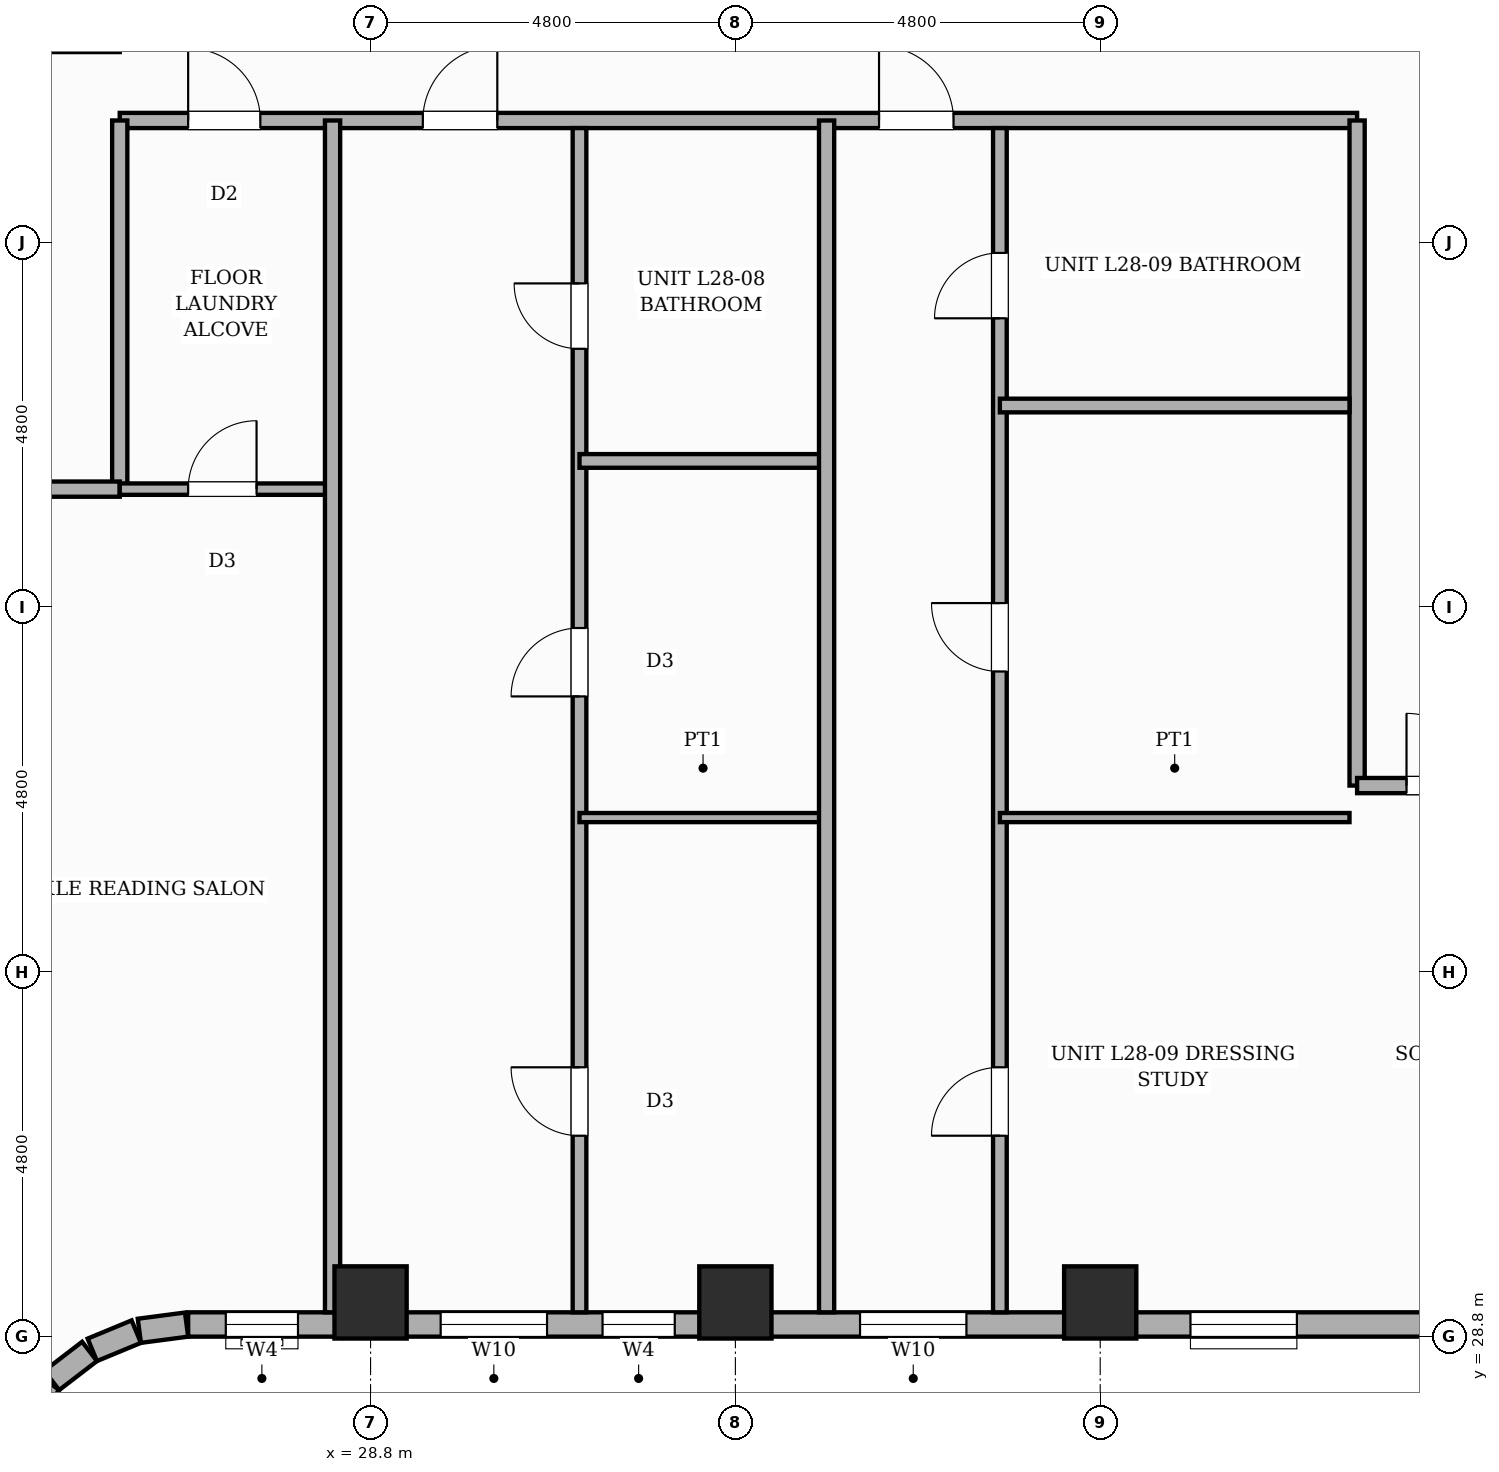
"""IFC4 building model, lengths in metres.
Left out: names, types, materials, properties, quantities, classifications, styles, units other than length and angle.
Written with IfcOpenShell. Run it as: python <this file> out.ifc"""

import sys

from ifc_helpers import new_model, si_unit, direction, frame, frame_2d, origin, origin_2d, place, context, subcontext, project, spatial, rectangle, extrude, element, fill, save


model = new_model("IFC4")
c1 = context("Model", 3, precision=1e-05, world=origin(), true_north=direction((0.0, 1.0)))
c2 = subcontext(c1, "Body", "Model", "MODEL_VIEW")
j1 = project(units=[si_unit("LENGTHUNIT", "METRE"), si_unit("PLANEANGLEUNIT", "RADIAN")], contexts=[c1])
p1 = place(None, origin())
s1 = spatial("IfcSite", under=j1, at=p1, CompositionType="ELEMENT")
p2 = place(p1, origin())
s2 = spatial("IfcBuilding", under=s1, at=p2, CompositionType="ELEMENT")
p3 = place(p2, frame((0.0, 0.0, 110.8)))
s3 = spatial("IfcBuildingStorey", under=s2, at=p3, CompositionType="ELEMENT", Elevation=110.8)
for number, where, z_axis, x_axis in (
    (1, (28.8, 29.25, 0.0), (0.0, 0.0, 1.0), (1.0, 0.0, 0.0)),
    (2, (33.6, 29.25, 0.0), (0.0, 0.0, 1.0), (1.0, 0.0, 0.0)),
    (3, (38.4, 29.25, 0.0), (0.0, 0.0, 1.0), (1.0, 0.0, 0.0)),
):
    element("IfcColumn", number, at=place(p3, frame(where, z_axis=z_axis, x_axis=x_axis)), inside=s3, PredefinedType="COLUMN", context=c2, shape_type="SweptSolid", body=[
        extrude(rectangle(XDim=0.95, YDim=0.95, at=origin_2d()), origin(), (0.0, 0.0, 1.0), 3.6),
    ])
p4 = place(p3, frame((50.4, 28.96, 0.0), z_axis=(0.0, 0.0, 1.0), x_axis=(-1.0, 0.0, 0.0)))
e4 = element("IfcWall", 4, at=p4, inside=s3, PredefinedType="STANDARD", context=c2, shape_type="SweptSolid", body=[
    extrude(rectangle(XDim=24.0, YDim=0.32, at=frame_2d((12.0, 0.0))), origin(), (0.0, 0.0, 1.0), 2.54),
])
p5 = place(p4, frame((19.278, 0.0, 0.65)))
e5 = element("IfcOpeningElement", 5, at=p5, cuts=e4, PredefinedType="OPENING", context=c2, shape_type="SweptSolid", body=[
    extrude(rectangle(XDim=1.4, YDim=1.1, at=frame_2d((0.7, 0.55))), frame((0.0, 0.17, 0.0), z_axis=(0.0, -1.0, 0.0), x_axis=(1.0, 0.0, 0.0)), (0.0, 0.0, 1.0), 0.34),
])
p6 = place(p4, frame((13.76, 0.0, 0.65)))
e6 = element("IfcOpeningElement", 6, at=p6, cuts=e4, PredefinedType="OPENING", context=c2, shape_type="SweptSolid", body=[
    extrude(rectangle(XDim=1.4, YDim=1.1, at=frame_2d((0.7, 0.55))), frame((0.0, 0.17, 0.0), z_axis=(0.0, -1.0, 0.0), x_axis=(1.0, 0.0, 0.0)), (0.0, 0.0, 1.0), 0.34),
])
p7 = place(p4, frame((22.555, 0.0, 0.45)))
e7 = element("IfcOpeningElement", 7, at=p7, cuts=e4, PredefinedType="OPENING", context=c2, shape_type="SweptSolid", body=[
    extrude(rectangle(XDim=0.95, YDim=1.8, at=frame_2d((0.475, 0.9))), frame((0.0, 0.17, 0.0), z_axis=(0.0, -1.0, 0.0), x_axis=(1.0, 0.0, 0.0)), (0.0, 0.0, 1.0), 0.34),
])
p8 = place(p4, frame((4.1, 0.0, 0.65)))
e8 = element("IfcOpeningElement", 8, at=p8, cuts=e4, PredefinedType="OPENING", context=c2, shape_type="SweptSolid", body=[
    extrude(rectangle(XDim=1.4, YDim=1.1, at=frame_2d((0.7, 0.55))), frame((0.0, 0.17, 0.0), z_axis=(0.0, -1.0, 0.0), x_axis=(1.0, 0.0, 0.0)), (0.0, 0.0, 1.0), 0.34),
])
p9 = place(p4, frame((17.598, 0.0, 0.45)))
e9 = element("IfcOpeningElement", 9, at=p9, cuts=e4, PredefinedType="OPENING", context=c2, shape_type="SweptSolid", body=[
    extrude(rectangle(XDim=0.95, YDim=1.8, at=frame_2d((0.475, 0.9))), frame((0.0, 0.17, 0.0), z_axis=(0.0, -1.0, 0.0), x_axis=(1.0, 0.0, 0.0)), (0.0, 0.0, 1.0), 0.34),
])
p10 = place(p4, frame((9.413, 0.0, 0.65)))
e10 = element("IfcOpeningElement", 10, at=p10, cuts=e4, PredefinedType="OPENING", context=c2, shape_type="SweptSolid", body=[
    extrude(rectangle(XDim=1.4, YDim=1.1, at=frame_2d((0.7, 0.55))), frame((0.0, 0.17, 0.0), z_axis=(0.0, -1.0, 0.0), x_axis=(1.0, 0.0, 0.0)), (0.0, 0.0, 1.0), 0.34),
])
p11 = place(p4, frame((0.656, 0.0, 0.45)))
e11 = element("IfcOpeningElement", 11, at=p11, cuts=e4, PredefinedType="OPENING", context=c2, shape_type="SweptSolid", body=[
    extrude(rectangle(XDim=0.95, YDim=1.8, at=frame_2d((0.475, 0.9))), frame((0.0, 0.17, 0.0), z_axis=(0.0, -1.0, 0.0), x_axis=(1.0, 0.0, 0.0)), (0.0, 0.0, 1.0), 0.34),
])
p12 = place(p3, frame((26.379, 28.958, 0.0), z_axis=(0.0, 0.0, 1.0), x_axis=(-0.991447664465, -0.130504898859, 0.0)))
e12 = element("IfcWall", 12, at=p12, inside=s3, PredefinedType="STANDARD", context=c2, shape_type="SweptSolid", body=[
    extrude(rectangle(XDim=0.627, YDim=0.32, at=frame_2d((0.313, 0.0))), origin(), (0.0, 0.0, 1.0), 2.54),
])
p13 = place(p3, frame((25.718, 28.866, 0.0), z_axis=(0.0, 0.0, 1.0), x_axis=(-0.923836271867, -0.382787856107, 0.0)))
e13 = element("IfcWall", 13, at=p13, inside=s3, PredefinedType="STANDARD", context=c2, shape_type="SweptSolid", body=[
    extrude(rectangle(XDim=0.626, YDim=0.32, at=frame_2d((0.313, 0.0))), origin(), (0.0, 0.0, 1.0), 3.36),
])
for number, where, z_axis, x_axis in (
    (14, (25.103, 28.605, 0.0), (0.0, 0.0, 1.0), (-0.793, -0.609, 0.0)),
    (15, (24.576, 28.195, 0.0), (0.0, 0.0, 1.0), (-0.609, -0.793, 0.0)),
):
    element("IfcWall", number, at=place(p3, frame(where, z_axis=z_axis, x_axis=x_axis)), inside=s3, PredefinedType="STANDARD", context=c2, shape_type="SweptSolid", body=[
        extrude(rectangle(XDim=0.626, YDim=0.32, at=frame_2d((0.313, 0.0))), origin(), (0.0, 0.0, 1.0), 3.36),
    ])
p14 = place(p3, frame((25.5, 44.8, 0.0), z_axis=(0.0, 0.0, 1.0), x_axis=(1.0, 0.0, 0.0)))
e16 = element("IfcWall", 16, at=p14, inside=s3, PredefinedType="PARTITIONING", context=c2, shape_type="SweptSolid", body=[
    extrude(rectangle(XDim=16.28, YDim=0.2, at=frame_2d((8.14, 0.0))), origin(), (0.0, 0.0, 1.0), 3.36),
])
p15 = place(p14, frame((0.9, 0.0, 0.0)))
e17 = element("IfcOpeningElement", 17, at=p15, cuts=e16, PredefinedType="OPENING", context=c2, shape_type="SweptSolid", body=[
    extrude(rectangle(XDim=0.95, YDim=2.15, at=frame_2d((0.475, 1.075))), frame((0.0, 0.11, 0.0), z_axis=(0.0, -1.0, 0.0), x_axis=(1.0, 0.0, 0.0)), (0.0, 0.0, 1.0), 0.22),
])
p16 = place(p14, frame((3.988, 0.0, 0.0)))
e18 = element("IfcOpeningElement", 18, at=p16, cuts=e16, PredefinedType="OPENING", context=c2, shape_type="SweptSolid", body=[
    extrude(rectangle(XDim=0.98, YDim=2.18, at=frame_2d((0.49, 1.09))), frame((0.0, 0.11, 0.0), z_axis=(0.0, -1.0, 0.0), x_axis=(1.0, 0.0, 0.0)), (0.0, 0.0, 1.0), 0.22),
])
p17 = place(p14, frame((9.99, 0.0, 0.0)))
e19 = element("IfcOpeningElement", 19, at=p17, cuts=e16, PredefinedType="OPENING", context=c2, shape_type="SweptSolid", body=[
    extrude(rectangle(XDim=0.98, YDim=2.18, at=frame_2d((0.49, 1.09))), frame((0.0, 0.11, 0.0), z_axis=(0.0, -1.0, 0.0), x_axis=(1.0, 0.0, 0.0)), (0.0, 0.0, 1.0), 0.22),
])
p18 = place(p3, frame((25.5, 39.95, 0.0), z_axis=(0.0, 0.0, 1.0), x_axis=(0.0, 1.0, 0.0)))
e20 = element("IfcWall", 20, at=p18, inside=s3, PredefinedType="PARTITIONING", context=c2, shape_type="SweptSolid", body=[
    extrude(rectangle(XDim=4.85, YDim=0.2, at=frame_2d((2.425, 0.0))), origin(), (0.0, 0.0, 1.0), 3.36),
])
p19 = place(p3, frame((22.75, 39.95, 0.0), z_axis=(0.0, 0.0, 1.0), x_axis=(1.0, 0.0, 0.0)))
e21 = element("IfcWall", 21, at=p19, inside=s3, PredefinedType="PARTITIONING", context=c2, shape_type="SweptSolid", body=[
    extrude(rectangle(XDim=2.75, YDim=0.2, at=frame_2d((1.375, 0.0))), origin(), (0.0, 0.0, 1.0), 3.36),
])
p20 = place(p3, frame((41.78, 36.05, 0.0), z_axis=(0.0, 0.0, 1.0), x_axis=(0.0, 1.0, 0.0)))
e22 = element("IfcWall", 22, at=p20, inside=s3, PredefinedType="PARTITIONING", context=c2, shape_type="SweptSolid", body=[
    extrude(rectangle(XDim=8.75, YDim=0.2, at=frame_2d((4.375, 0.0))), origin(), (0.0, 0.0, 1.0), 3.36),
])
p21 = place(p3, frame((41.78, 36.05, 0.0), z_axis=(0.0, 0.0, 1.0), x_axis=(1.0, 0.0, 0.0)))
e23 = element("IfcWall", 23, at=p21, inside=s3, PredefinedType="PARTITIONING", context=c2, shape_type="SweptSolid", body=[
    extrude(rectangle(XDim=2.24, YDim=0.2, at=frame_2d((1.12, 0.0))), origin(), (0.0, 0.0, 1.0), 3.36),
])
p22 = place(p21, frame((0.65, 0.0, 0.0)))
e24 = element("IfcOpeningElement", 24, at=p22, cuts=e23, PredefinedType="OPENING", context=c2, shape_type="SweptSolid", body=[
    extrude(rectangle(XDim=0.95, YDim=2.15, at=frame_2d((0.475, 1.075))), frame((0.0, 0.11, 0.0), z_axis=(0.0, -1.0, 0.0), x_axis=(1.0, 0.0, 0.0)), (0.0, 0.0, 1.0), 0.22),
])
p23 = place(p3, frame((25.5, 39.95, 0.0), z_axis=(0.0, 0.0, 1.0), x_axis=(1.0, 0.0, 0.0)))
e25 = element("IfcWall", 25, at=p23, inside=s3, PredefinedType="PARTITIONING", context=c2, shape_type="SweptSolid", body=[
    extrude(rectangle(XDim=2.8, YDim=0.15, at=frame_2d((1.4, 0.0))), origin(), (0.0, 0.0, 1.0), 3.36),
])
p24 = place(p23, frame((0.9, 0.0, 0.0)))
e26 = element("IfcOpeningElement", 26, at=p24, cuts=e25, PredefinedType="OPENING", context=c2, shape_type="SweptSolid", body=[
    extrude(rectangle(XDim=0.9, YDim=2.15, at=frame_2d((0.45, 1.075))), frame((0.0, 0.085, 0.0), z_axis=(0.0, -1.0, 0.0), x_axis=(1.0, 0.0, 0.0)), (0.0, 0.0, 1.0), 0.17),
])
p25 = place(p3, frame((28.3, 29.12, 0.0), z_axis=(0.0, 0.0, 1.0), x_axis=(0.0, 1.0, 0.0)))
e27 = element("IfcWall", 27, at=p25, inside=s3, PredefinedType="SOLIDWALL", context=c2, shape_type="SweptSolid", body=[
    extrude(rectangle(XDim=15.68, YDim=0.2, at=frame_2d((7.84, 0.0))), origin(), (0.0, 0.0, 1.0), 3.36),
])
p26 = place(p3, frame((31.549, 29.12, 0.0), z_axis=(0.0, 0.0, 1.0), x_axis=(0.0, 1.0, 0.0)))
e28 = element("IfcWall", 28, at=p26, inside=s3, PredefinedType="PLUMBINGWALL", context=c2, shape_type="SweptSolid", body=[
    extrude(rectangle(XDim=15.58, YDim=0.18, at=frame_2d((7.79, 0.0))), origin(), (0.0, 0.0, 1.0), 3.36),
])
p27 = place(p26, frame((2.323, 0.0, 0.0)))
e29 = element("IfcOpeningElement", 29, at=p27, cuts=e28, PredefinedType="OPENING", context=c2, shape_type="SweptSolid", body=[
    extrude(rectangle(XDim=0.9, YDim=2.15, at=frame_2d((0.45, 1.075))), frame((0.0, 0.1, 0.0), z_axis=(0.0, -1.0, 0.0), x_axis=(1.0, 0.0, 0.0)), (0.0, 0.0, 1.0), 0.2),
])
p28 = place(p26, frame((8.103, 0.0, 0.0)))
e30 = element("IfcOpeningElement", 30, at=p28, cuts=e28, PredefinedType="OPENING", context=c2, shape_type="SweptSolid", body=[
    extrude(rectangle(XDim=0.9, YDim=2.15, at=frame_2d((0.45, 1.075))), frame((0.0, 0.1, 0.0), z_axis=(0.0, -1.0, 0.0), x_axis=(1.0, 0.0, 0.0)), (0.0, 0.0, 1.0), 0.2),
])
p29 = place(p26, frame((12.677, 0.0, 0.0)))
e31 = element("IfcOpeningElement", 31, at=p29, cuts=e28, PredefinedType="OPENING", context=c2, shape_type="SweptSolid", body=[
    extrude(rectangle(XDim=0.86, YDim=2.1, at=frame_2d((0.43, 1.05))), frame((0.0, 0.1, 0.0), z_axis=(0.0, -1.0, 0.0), x_axis=(1.0, 0.0, 0.0)), (0.0, 0.0, 1.0), 0.2),
])
p30 = place(p3, frame((31.549, 35.629, 0.0), z_axis=(0.0, 0.0, 1.0), x_axis=(1.0, 0.0, 0.0)))
e32 = element("IfcWall", 32, at=p30, inside=s3, PredefinedType="PARTITIONING", context=c2, shape_type="SweptSolid", body=[
    extrude(rectangle(XDim=3.251, YDim=0.12, at=frame_2d((1.625, 0.0))), origin(), (0.0, 0.0, 1.0), 3.36),
])
p31 = place(p3, frame((31.549, 40.321, 0.0), z_axis=(0.0, 0.0, 1.0), x_axis=(1.0, 0.0, 0.0)))
e33 = element("IfcWall", 33, at=p31, inside=s3, PredefinedType="PLUMBINGWALL", context=c2, shape_type="SweptSolid", body=[
    extrude(rectangle(XDim=3.251, YDim=0.18, at=frame_2d((1.625, 0.0))), origin(), (0.0, 0.0, 1.0), 3.36),
])
p32 = place(p3, frame((34.8, 29.12, 0.0), z_axis=(0.0, 0.0, 1.0), x_axis=(0.0, 1.0, 0.0)))
e34 = element("IfcWall", 34, at=p32, inside=s3, PredefinedType="SOLIDWALL", context=c2, shape_type="SweptSolid", body=[
    extrude(rectangle(XDim=15.68, YDim=0.2, at=frame_2d((7.84, 0.0))), origin(), (0.0, 0.0, 1.0), 3.36),
])
p33 = place(p3, frame((37.08, 29.12, 0.0), z_axis=(0.0, 0.0, 1.0), x_axis=(0.0, 1.0, 0.0)))
e35 = element("IfcWall", 35, at=p33, inside=s3, PredefinedType="PLUMBINGWALL", context=c2, shape_type="SweptSolid", body=[
    extrude(rectangle(XDim=15.58, YDim=0.18, at=frame_2d((7.79, 0.0))), origin(), (0.0, 0.0, 1.0), 3.36),
])
p34 = place(p33, frame((2.323, 0.0, 0.0)))
e36 = element("IfcOpeningElement", 36, at=p34, cuts=e35, PredefinedType="OPENING", context=c2, shape_type="SweptSolid", body=[
    extrude(rectangle(XDim=0.9, YDim=2.15, at=frame_2d((0.45, 1.075))), frame((0.0, 0.1, 0.0), z_axis=(0.0, -1.0, 0.0), x_axis=(1.0, 0.0, 0.0)), (0.0, 0.0, 1.0), 0.2),
])
p35 = place(p33, frame((8.431, 0.0, 0.0)))
e37 = element("IfcOpeningElement", 37, at=p35, cuts=e35, PredefinedType="OPENING", context=c2, shape_type="SweptSolid", body=[
    extrude(rectangle(XDim=0.9, YDim=2.15, at=frame_2d((0.45, 1.075))), frame((0.0, 0.1, 0.0), z_axis=(0.0, -1.0, 0.0), x_axis=(1.0, 0.0, 0.0)), (0.0, 0.0, 1.0), 0.2),
])
p36 = place(p33, frame((13.077, 0.0, 0.0)))
e38 = element("IfcOpeningElement", 38, at=p36, cuts=e35, PredefinedType="OPENING", context=c2, shape_type="SweptSolid", body=[
    extrude(rectangle(XDim=0.86, YDim=2.1, at=frame_2d((0.43, 1.05))), frame((0.0, 0.1, 0.0), z_axis=(0.0, -1.0, 0.0), x_axis=(1.0, 0.0, 0.0)), (0.0, 0.0, 1.0), 0.2),
])
p37 = place(p3, frame((37.08, 35.629, 0.0), z_axis=(0.0, 0.0, 1.0), x_axis=(1.0, 0.0, 0.0)))
e39 = element("IfcWall", 39, at=p37, inside=s3, PredefinedType="PARTITIONING", context=c2, shape_type="SweptSolid", body=[
    extrude(rectangle(XDim=4.6, YDim=0.12, at=frame_2d((2.3, 0.0))), origin(), (0.0, 0.0, 1.0), 3.36),
])
p38 = place(p3, frame((37.08, 41.05, 0.0), z_axis=(0.0, 0.0, 1.0), x_axis=(1.0, 0.0, 0.0)))
e40 = element("IfcWall", 40, at=p38, inside=s3, PredefinedType="PLUMBINGWALL", context=c2, shape_type="SweptSolid", body=[
    extrude(rectangle(XDim=4.6, YDim=0.18, at=frame_2d((2.3, 0.0))), origin(), (0.0, 0.0, 1.0), 3.36),
])
p39 = place(p5, origin())
e41 = element("IfcWindow", 41, at=p39, inside=s3, PartitioningType="SINGLE_PANEL", PredefinedType="WINDOW", context=c2, shape_type="SweptSolid", body=[
    extrude(rectangle(XDim=1.4, YDim=1.1, at=frame_2d((0.7, 0.55))), frame((0.0, 0.03, 0.0), z_axis=(0.0, -1.0, 0.0), x_axis=(1.0, 0.0, 0.0)), (0.0, 0.0, 1.0), 0.06),
])
fill(e5, e41)
p40 = place(p6, origin())
e42 = element("IfcWindow", 42, at=p40, inside=s3, PartitioningType="SINGLE_PANEL", PredefinedType="WINDOW", context=c2, shape_type="SweptSolid", body=[
    extrude(rectangle(XDim=1.4, YDim=1.1, at=frame_2d((0.7, 0.55))), frame((0.0, 0.03, 0.0), z_axis=(0.0, -1.0, 0.0), x_axis=(1.0, 0.0, 0.0)), (0.0, 0.0, 1.0), 0.06),
])
fill(e6, e42)
p41 = place(p7, origin())
e43 = element("IfcWindow", 43, at=p41, inside=s3, PartitioningType="SINGLE_PANEL", PredefinedType="WINDOW", context=c2, shape_type="SweptSolid", body=[
    extrude(rectangle(XDim=0.95, YDim=1.8, at=frame_2d((0.475, 0.9))), frame((0.0, 0.03, 0.0), z_axis=(0.0, -1.0, 0.0), x_axis=(1.0, 0.0, 0.0)), (0.0, 0.0, 1.0), 0.06),
])
fill(e7, e43)
p42 = place(p9, origin())
e44 = element("IfcWindow", 44, at=p42, inside=s3, PartitioningType="SINGLE_PANEL", PredefinedType="WINDOW", context=c2, shape_type="SweptSolid", body=[
    extrude(rectangle(XDim=0.95, YDim=1.8, at=frame_2d((0.475, 0.9))), frame((0.0, 0.03, 0.0), z_axis=(0.0, -1.0, 0.0), x_axis=(1.0, 0.0, 0.0)), (0.0, 0.0, 1.0), 0.06),
])
fill(e9, e44)
p43 = place(p10, origin())
e45 = element("IfcWindow", 45, at=p43, inside=s3, PartitioningType="SINGLE_PANEL", PredefinedType="WINDOW", context=c2, shape_type="SweptSolid", body=[
    extrude(rectangle(XDim=1.4, YDim=1.1, at=frame_2d((0.7, 0.55))), frame((0.0, 0.03, 0.0), z_axis=(0.0, -1.0, 0.0), x_axis=(1.0, 0.0, 0.0)), (0.0, 0.0, 1.0), 0.06),
])
fill(e10, e45)
p44 = place(p15, origin())
e46 = element("IfcDoor", 46, at=p44, inside=s3, OperationType="SINGLE_SWING_LEFT", PredefinedType="DOOR", context=c2, shape_type="SweptSolid", body=[
    extrude(rectangle(XDim=0.95, YDim=2.15, at=frame_2d((0.475, 1.075))), frame((0.0, 0.025, 0.0), z_axis=(0.0, -1.0, 0.0), x_axis=(1.0, 0.0, 0.0)), (0.0, 0.0, 1.0), 0.05),
])
fill(e17, e46)
p45 = place(p24, origin())
e47 = element("IfcDoor", 47, at=p45, inside=s3, OperationType="SINGLE_SWING_RIGHT", PredefinedType="DOOR", context=c2, shape_type="SweptSolid", body=[
    extrude(rectangle(XDim=0.9, YDim=2.15, at=frame_2d((0.45, 1.075))), frame((0.0, 0.025, 0.0), z_axis=(0.0, -1.0, 0.0), x_axis=(1.0, 0.0, 0.0)), (0.0, 0.0, 1.0), 0.05),
])
fill(e26, e47)
p46 = place(p16, origin())
e48 = element("IfcDoor", 48, at=p46, inside=s3, OperationType="SINGLE_SWING_RIGHT", PredefinedType="DOOR", context=c2, shape_type="SweptSolid", body=[
    extrude(rectangle(XDim=0.98, YDim=2.18, at=frame_2d((0.49, 1.09))), frame((0.0, 0.025, 0.0), z_axis=(0.0, -1.0, 0.0), x_axis=(1.0, 0.0, 0.0)), (0.0, 0.0, 1.0), 0.05),
])
fill(e18, e48)
p47 = place(p27, origin())
e49 = element("IfcDoor", 49, at=p47, inside=s3, OperationType="SINGLE_SWING_RIGHT", PredefinedType="DOOR", context=c2, shape_type="SweptSolid", body=[
    extrude(rectangle(XDim=0.9, YDim=2.15, at=frame_2d((0.45, 1.075))), frame((0.0, 0.025, 0.0), z_axis=(0.0, -1.0, 0.0), x_axis=(1.0, 0.0, 0.0)), (0.0, 0.0, 1.0), 0.05),
])
fill(e29, e49)
p48 = place(p28, origin())
e50 = element("IfcDoor", 50, at=p48, inside=s3, OperationType="SINGLE_SWING_LEFT", PredefinedType="DOOR", context=c2, shape_type="SweptSolid", body=[
    extrude(rectangle(XDim=0.9, YDim=2.15, at=frame_2d((0.45, 1.075))), frame((0.0, 0.025, 0.0), z_axis=(0.0, -1.0, 0.0), x_axis=(1.0, 0.0, 0.0)), (0.0, 0.0, 1.0), 0.05),
])
fill(e30, e50)
p49 = place(p29, origin())
e51 = element("IfcDoor", 51, at=p49, inside=s3, OperationType="SINGLE_SWING_RIGHT", PredefinedType="DOOR", context=c2, shape_type="SweptSolid", body=[
    extrude(rectangle(XDim=0.86, YDim=2.1, at=frame_2d((0.43, 1.05))), frame((0.0, 0.025, 0.0), z_axis=(0.0, -1.0, 0.0), x_axis=(1.0, 0.0, 0.0)), (0.0, 0.0, 1.0), 0.05),
])
fill(e31, e51)
p50 = place(p17, origin())
e52 = element("IfcDoor", 52, at=p50, inside=s3, OperationType="SINGLE_SWING_LEFT", PredefinedType="DOOR", context=c2, shape_type="SweptSolid", body=[
    extrude(rectangle(XDim=0.98, YDim=2.18, at=frame_2d((0.49, 1.09))), frame((0.0, 0.025, 0.0), z_axis=(0.0, -1.0, 0.0), x_axis=(1.0, 0.0, 0.0)), (0.0, 0.0, 1.0), 0.05),
])
fill(e19, e52)
p51 = place(p34, origin())
e53 = element("IfcDoor", 53, at=p51, inside=s3, OperationType="SINGLE_SWING_LEFT", PredefinedType="DOOR", context=c2, shape_type="SweptSolid", body=[
    extrude(rectangle(XDim=0.9, YDim=2.15, at=frame_2d((0.45, 1.075))), frame((0.0, 0.025, 0.0), z_axis=(0.0, -1.0, 0.0), x_axis=(1.0, 0.0, 0.0)), (0.0, 0.0, 1.0), 0.05),
])
fill(e36, e53)
p52 = place(p35, origin())
e54 = element("IfcDoor", 54, at=p52, inside=s3, OperationType="SINGLE_SWING_RIGHT", PredefinedType="DOOR", context=c2, shape_type="SweptSolid", body=[
    extrude(rectangle(XDim=0.9, YDim=2.15, at=frame_2d((0.45, 1.075))), frame((0.0, 0.025, 0.0), z_axis=(0.0, -1.0, 0.0), x_axis=(1.0, 0.0, 0.0)), (0.0, 0.0, 1.0), 0.05),
])
fill(e37, e54)
p53 = place(p36, origin())
e55 = element("IfcDoor", 55, at=p53, inside=s3, OperationType="SINGLE_SWING_LEFT", PredefinedType="DOOR", context=c2, shape_type="SweptSolid", body=[
    extrude(rectangle(XDim=0.86, YDim=2.1, at=frame_2d((0.43, 1.05))), frame((0.0, 0.025, 0.0), z_axis=(0.0, -1.0, 0.0), x_axis=(1.0, 0.0, 0.0)), (0.0, 0.0, 1.0), 0.05),
])
fill(e38, e55)
p54 = place(p22, origin())
e56 = element("IfcDoor", 56, at=p54, inside=s3, OperationType="SINGLE_SWING_LEFT", PredefinedType="DOOR", context=c2, shape_type="SweptSolid", body=[
    extrude(rectangle(XDim=0.95, YDim=2.15, at=frame_2d((0.475, 1.075))), frame((0.0, 0.025, 0.0), z_axis=(0.0, -1.0, 0.0), x_axis=(1.0, 0.0, 0.0)), (0.0, 0.0, 1.0), 0.05),
])
fill(e24, e56)
save(model, sys.argv[1])
